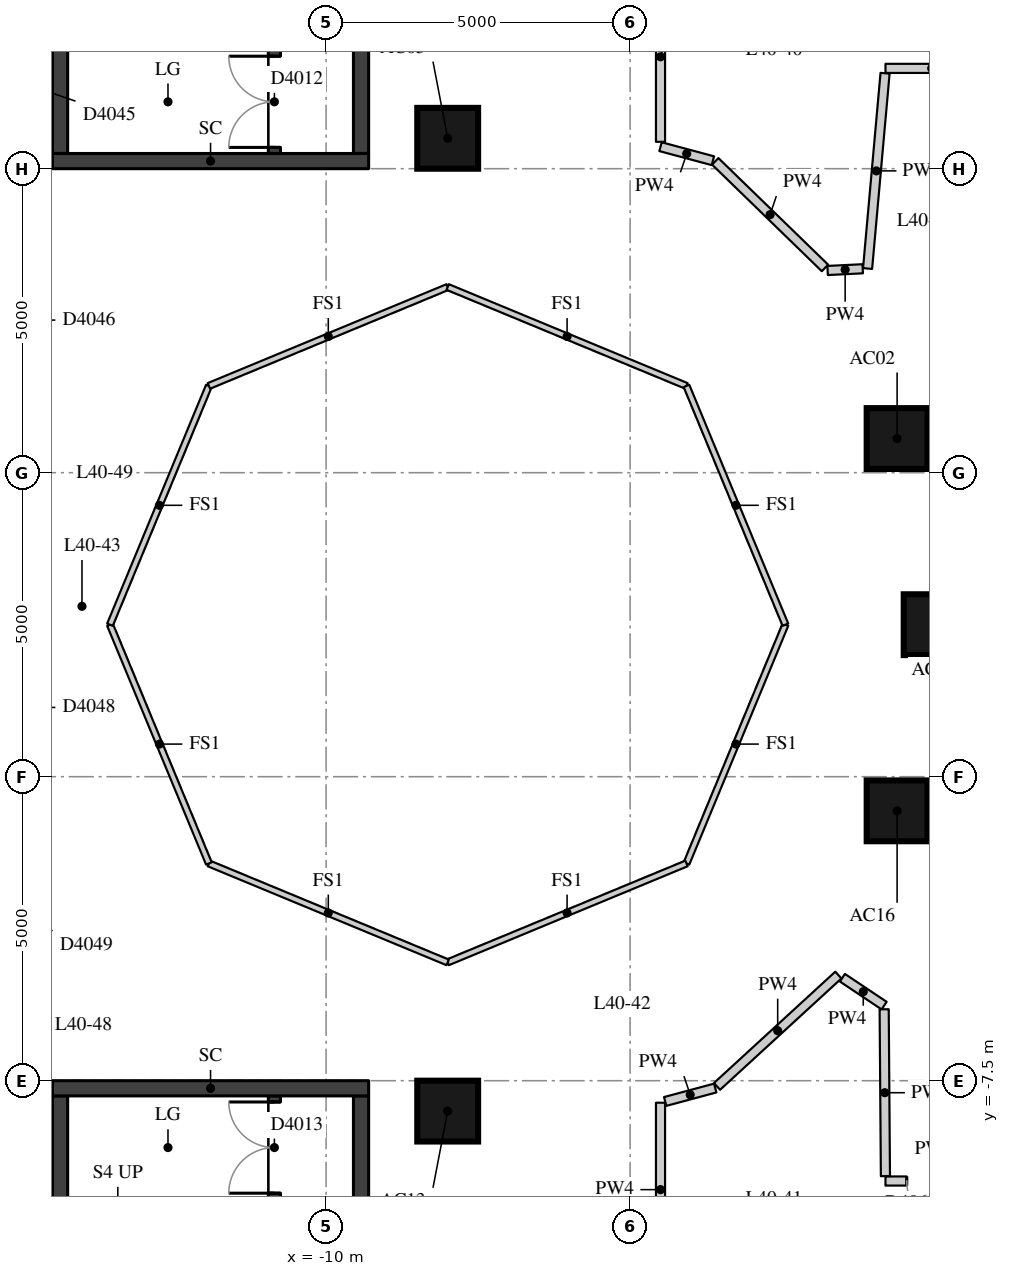
"""IFC4 building model, lengths in metres.
Left out: names, types, materials, properties, quantities, classifications, styles, units other than length and angle.
Written with IfcOpenShell. Run it as: python <this file> out.ifc"""

import sys

from ifc_helpers import new_model, si_unit, direction, frame, frame_2d, origin, origin_2d, place, context, subcontext, project, spatial, rectangle, extrude, element, fill, save


model = new_model("IFC4")
c1 = context("Model", 3, precision=1e-05, world=origin(), true_north=direction((0.0, 1.0)))
c2 = subcontext(c1, "Body", "Model", "MODEL_VIEW")
j1 = project(units=[si_unit("LENGTHUNIT", "METRE"), si_unit("PLANEANGLEUNIT", "RADIAN")], contexts=[c1])
p1 = place(None, origin())
s1 = spatial("IfcSite", under=j1, at=p1, CompositionType="ELEMENT")
p2 = place(p1, origin())
s2 = spatial("IfcBuilding", under=s1, at=p2, CompositionType="ELEMENT")
p3 = place(p2, frame((0.0, 0.0, 145.1)))
s3 = spatial("IfcBuildingStorey", under=s2, at=p3, CompositionType="ELEMENT", Elevation=145.1)
for number, where, z_axis, x_axis in (
    (1, (0.0, 0.0, 0.0), (0.0, 0.0, 1.0), (1.0, 0.0, 0.0)),
    (2, (-0.609, 3.062, 0.0), (0.0, 0.0, 1.0), (1.0, 0.0, 0.0)),
    (3, (-8.0, 8.0, 0.0), (0.0, 0.0, 1.0), (1.0, 0.0, 0.0)),
    (4, (-8.0, -8.0, 0.0), (0.0, 0.0, 1.0), (1.0, 0.0, 0.0)),
    (5, (-0.609, -3.062, 0.0), (0.0, 0.0, 1.0), (1.0, 0.0, 0.0)),
):
    element("IfcColumn", number, at=place(p3, frame(where, z_axis=z_axis, x_axis=x_axis)), inside=s3, PredefinedType="COLUMN", context=c2, shape_type="SweptSolid", body=[
        extrude(rectangle(XDim=1.0, YDim=1.0, at=origin_2d()), origin(), (0.0, 0.0, 1.0), 3.3),
    ])
p4 = place(p3, frame((-10.85, 7.75, 0.0), z_axis=(0.0, 0.0, 1.0), x_axis=(0.0, 1.0, 0.0)))
e6 = element("IfcWall", 6, at=p4, inside=s3, PredefinedType="SHEAR", context=c2, shape_type="SweptSolid", body=[
    extrude(rectangle(XDim=6.0, YDim=0.2, at=frame_2d((3.0, 0.0))), origin(), (0.0, 0.0, 1.0), 3.02),
])
p5 = place(p4, frame((0.1, 0.0, 0.0)))
e7 = element("IfcOpeningElement", 7, at=p5, cuts=e6, PredefinedType="OPENING", context=c2, shape_type="SweptSolid", body=[
    extrude(rectangle(XDim=1.5, YDim=2.1, at=frame_2d((0.75, 1.05))), frame((0.0, 0.11, 0.0), z_axis=(0.0, -1.0, 0.0), x_axis=(1.0, 0.0, 0.0)), (0.0, 0.0, 1.0), 0.22),
])
p6 = place(p3, frame((-10.85, -13.75, 0.0), z_axis=(0.0, 0.0, 1.0), x_axis=(0.0, 1.0, 0.0)))
e8 = element("IfcWall", 8, at=p6, inside=s3, PredefinedType="SHEAR", context=c2, shape_type="SweptSolid", body=[
    extrude(rectangle(XDim=6.0, YDim=0.2, at=frame_2d((3.0, 0.0))), origin(), (0.0, 0.0, 1.0), 3.02),
])
p7 = place(p6, frame((4.4, 0.0, 0.0)))
e9 = element("IfcOpeningElement", 9, at=p7, cuts=e8, PredefinedType="OPENING", context=c2, shape_type="SweptSolid", body=[
    extrude(rectangle(XDim=1.5, YDim=2.1, at=frame_2d((0.75, 1.05))), frame((0.0, 0.11, 0.0), z_axis=(0.0, -1.0, 0.0), x_axis=(1.0, 0.0, 0.0)), (0.0, 0.0, 1.0), 0.22),
])
p8 = place(p3, frame((-14.375, 7.75, -0.28), z_axis=(0.0, 0.0, 1.0), x_axis=(0.0, 1.0, 0.0)))
e10 = element("IfcWall", 10, at=p8, inside=s3, PredefinedType="SHEAR", context=c2, shape_type="SweptSolid", body=[
    extrude(rectangle(XDim=6.0, YDim=0.25, at=frame_2d((3.0, 0.0))), origin(), (0.0, 0.0, 1.0), 3.3),
])
p9 = place(p3, frame((-9.425, 7.75, -0.28), z_axis=(0.0, 0.0, 1.0), x_axis=(0.0, 1.0, 0.0)))
e11 = element("IfcWall", 11, at=p9, inside=s3, PredefinedType="SHEAR", context=c2, shape_type="SweptSolid", body=[
    extrude(rectangle(XDim=6.0, YDim=0.25, at=frame_2d((3.0, 0.0))), origin(), (0.0, 0.0, 1.0), 3.3),
])
p10 = place(p9, frame((2.1, 0.0, 0.28)))
e12 = element("IfcOpeningElement", 12, at=p10, cuts=e11, PredefinedType="OPENING", context=c2, shape_type="SweptSolid", body=[
    extrude(rectangle(XDim=1.5, YDim=2.1, at=frame_2d((0.75, 1.05))), frame((0.0, 0.135, 0.0), z_axis=(0.0, -1.0, 0.0), x_axis=(1.0, 0.0, 0.0)), (0.0, 0.0, 1.0), 0.27),
])
p11 = place(p3, frame((-14.5, 7.625, -0.28), z_axis=(0.0, 0.0, 1.0), x_axis=(1.0, 0.0, 0.0)))
e13 = element("IfcWall", 13, at=p11, inside=s3, PredefinedType="SHEAR", context=c2, shape_type="SweptSolid", body=[
    extrude(rectangle(XDim=5.2, YDim=0.25, at=frame_2d((2.6, 0.0))), origin(), (0.0, 0.0, 1.0), 3.3),
])
p12 = place(p3, frame((-14.375, -13.75, -0.28), z_axis=(0.0, 0.0, 1.0), x_axis=(0.0, 1.0, 0.0)))
e14 = element("IfcWall", 14, at=p12, inside=s3, PredefinedType="SHEAR", context=c2, shape_type="SweptSolid", body=[
    extrude(rectangle(XDim=6.0, YDim=0.25, at=frame_2d((3.0, 0.0))), origin(), (0.0, 0.0, 1.0), 3.3),
])
p13 = place(p3, frame((-9.425, -13.75, -0.28), z_axis=(0.0, 0.0, 1.0), x_axis=(0.0, 1.0, 0.0)))
e15 = element("IfcWall", 15, at=p13, inside=s3, PredefinedType="SHEAR", context=c2, shape_type="SweptSolid", body=[
    extrude(rectangle(XDim=6.0, YDim=0.25, at=frame_2d((3.0, 0.0))), origin(), (0.0, 0.0, 1.0), 3.3),
])
p14 = place(p13, frame((2.4, 0.0, 0.28)))
e16 = element("IfcOpeningElement", 16, at=p14, cuts=e15, PredefinedType="OPENING", context=c2, shape_type="SweptSolid", body=[
    extrude(rectangle(XDim=1.5, YDim=2.1, at=frame_2d((0.75, 1.05))), frame((0.0, 0.135, 0.0), z_axis=(0.0, -1.0, 0.0), x_axis=(1.0, 0.0, 0.0)), (0.0, 0.0, 1.0), 0.27),
])
p15 = place(p3, frame((-14.5, -7.625, -0.28), z_axis=(0.0, 0.0, 1.0), x_axis=(1.0, 0.0, 0.0)))
e17 = element("IfcWall", 17, at=p15, inside=s3, PredefinedType="SHEAR", context=c2, shape_type="SweptSolid", body=[
    extrude(rectangle(XDim=5.2, YDim=0.25, at=frame_2d((2.6, 0.0))), origin(), (0.0, 0.0, 1.0), 3.3),
])
p16 = place(p3, frame((-14.59, -7.807, 0.0), z_axis=(0.0, 0.0, 1.0), x_axis=(-0.280401457903, 0.959882817018, 0.0)))
e18 = element("IfcWall", 18, at=p16, inside=s3, PredefinedType="PARTITIONING", context=c2, shape_type="SweptSolid", body=[
    extrude(rectangle(XDim=2.195, YDim=0.2, at=frame_2d((1.098, 0.0))), origin(), (0.0, 0.0, 1.0), 3.02),
])
p17 = place(p3, frame((-16.228, 7.992, 0.0), z_axis=(0.0, 0.0, 1.0), x_axis=(0.513936465122, 0.857828251935, 0.0)))
e19 = element("IfcWall", 19, at=p17, inside=s3, PredefinedType="PARTITIONING", context=c2, shape_type="SweptSolid", body=[
    extrude(rectangle(XDim=3.21, YDim=0.2, at=frame_2d((1.605, 0.0))), origin(), (0.0, 0.0, 1.0), 3.02),
])
p18 = place(p17, frame((0.848, 0.0, 0.0)))
e20 = element("IfcOpeningElement", 20, at=p18, cuts=e19, PredefinedType="OPENING", context=c2, shape_type="SweptSolid", body=[
    extrude(rectangle(XDim=0.9, YDim=2.1, at=frame_2d((0.45, 1.05))), frame((0.0, 0.11, 0.0), z_axis=(0.0, -1.0, 0.0), x_axis=(1.0, 0.0, 0.0)), (0.0, 0.0, 1.0), 0.22),
])
p19 = place(p3, frame((0.72, 9.15, 0.0), z_axis=(0.0, 0.0, 1.0), x_axis=(-1.0, 0.0, 0.0)))
e21 = element("IfcWall", 21, at=p19, inside=s3, PredefinedType="PARTITIONING", context=c2, shape_type="SweptSolid", body=[
    extrude(rectangle(XDim=1.52, YDim=0.15, at=frame_2d((0.76, 0.0))), origin(), (0.0, 0.0, 1.0), 3.02),
])
p20 = place(p3, frame((-0.807, 9.07, 0.0), z_axis=(0.0, 0.0, 1.0), x_axis=(-0.089184087733, -0.996015159772, 0.0)))
e22 = element("IfcWall", 22, at=p20, inside=s3, PredefinedType="PARTITIONING", context=c2, shape_type="SweptSolid", body=[
    extrude(rectangle(XDim=3.225, YDim=0.15, at=frame_2d((1.612, 0.0))), origin(), (0.0, 0.0, 1.0), 3.02),
])
p21 = place(p3, frame((-1.175, 5.854, 0.0), z_axis=(0.0, 0.0, 1.0), x_axis=(-0.998798267986, -0.049010405705, 0.0)))
e23 = element("IfcWall", 23, at=p21, inside=s3, PredefinedType="PARTITIONING", context=c2, shape_type="SweptSolid", body=[
    extrude(rectangle(XDim=0.578, YDim=0.15, at=frame_2d((0.289, 0.0))), origin(), (0.0, 0.0, 1.0), 3.02),
])
p22 = place(p3, frame((-1.795, 5.867, 0.0), z_axis=(0.0, 0.0, 1.0), x_axis=(-0.717315398231, 0.696748605639, 0.0)))
e24 = element("IfcWall", 24, at=p22, inside=s3, PredefinedType="PARTITIONING", context=c2, shape_type="SweptSolid", body=[
    extrude(rectangle(XDim=2.517, YDim=0.15, at=frame_2d((1.258, 0.0))), origin(), (0.0, 0.0, 1.0), 3.02),
])
p23 = place(p3, frame((-3.639, 7.631, 0.0), z_axis=(0.0, 0.0, 1.0), x_axis=(-0.965879594242, 0.258991523853, 0.0)))
e25 = element("IfcWall", 25, at=p23, inside=s3, PredefinedType="PARTITIONING", context=c2, shape_type="SweptSolid", body=[
    extrude(rectangle(XDim=0.892, YDim=0.15, at=frame_2d((0.446, 0.0))), origin(), (0.0, 0.0, 1.0), 3.02),
])
p24 = place(p3, frame((-4.5, 7.942, 0.0), z_axis=(0.0, 0.0, 1.0), x_axis=(0.0, 1.0, 0.0)))
e26 = element("IfcWall", 26, at=p24, inside=s3, PredefinedType="PARTITIONING", context=c2, shape_type="SweptSolid", body=[
    extrude(rectangle(XDim=2.796, YDim=0.15, at=frame_2d((1.398, 0.0))), origin(), (0.0, 0.0, 1.0), 3.02),
])
p25 = place(p3, frame((-0.8, -9.15, 0.0), z_axis=(0.0, 0.0, 1.0), x_axis=(1.0, 0.0, 0.0)))
e27 = element("IfcWall", 27, at=p25, inside=s3, PredefinedType="PARTITIONING", context=c2, shape_type="SweptSolid", body=[
    extrude(rectangle(XDim=1.6, YDim=0.15, at=frame_2d((0.8, 0.0))), origin(), (0.0, 0.0, 1.0), 3.02),
])
p26 = place(p25, frame((0.35, 0.0, 0.0)))
e28 = element("IfcOpeningElement", 28, at=p26, cuts=e27, PredefinedType="OPENING", context=c2, shape_type="SweptSolid", body=[
    extrude(rectangle(XDim=0.9, YDim=2.1, at=frame_2d((0.45, 1.05))), frame((0.0, 0.085, 0.0), z_axis=(0.0, -1.0, 0.0), x_axis=(1.0, 0.0, 0.0)), (0.0, 0.0, 1.0), 0.17),
])
p27 = place(p3, frame((-4.5, -10.721, 0.0), z_axis=(0.0, 0.0, 1.0), x_axis=(0.0, 1.0, 0.0)))
e29 = element("IfcWall", 29, at=p27, inside=s3, PredefinedType="PARTITIONING", context=c2, shape_type="SweptSolid", body=[
    extrude(rectangle(XDim=2.859, YDim=0.15, at=frame_2d((1.43, 0.0))), origin(), (0.0, 0.0, 1.0), 3.02),
])
p28 = place(p3, frame((-4.423, -7.842, 0.0), z_axis=(0.0, 0.0, 1.0), x_axis=(0.965853333569, 0.259089440221, 0.0)))
e30 = element("IfcWall", 30, at=p28, inside=s3, PredefinedType="PARTITIONING", context=c2, shape_type="SweptSolid", body=[
    extrude(rectangle(XDim=0.852, YDim=0.15, at=frame_2d((0.426, 0.0))), origin(), (0.0, 0.0, 1.0), 3.02),
])
p29 = place(p3, frame((-3.571, -7.594, 0.0), z_axis=(0.0, 0.0, 1.0), x_axis=(0.736783660812, 0.676128565555, 0.0)))
e31 = element("IfcWall", 31, at=p29, inside=s3, PredefinedType="PARTITIONING", context=c2, shape_type="SweptSolid", body=[
    extrude(rectangle(XDim=2.709, YDim=0.15, at=frame_2d((1.354, 0.0))), origin(), (0.0, 0.0, 1.0), 3.02),
])
p30 = place(p3, frame((-1.509, -5.806, 0.0), z_axis=(0.0, 0.0, 1.0), x_axis=(0.831367153095, -0.55572354346, 0.0)))
e32 = element("IfcWall", 32, at=p30, inside=s3, PredefinedType="PARTITIONING", context=c2, shape_type="SweptSolid", body=[
    extrude(rectangle(XDim=0.825, YDim=0.15, at=frame_2d((0.413, 0.0))), origin(), (0.0, 0.0, 1.0), 3.02),
])
p31 = place(p3, frame((-0.822, -6.325, 0.0), z_axis=(0.0, 0.0, 1.0), x_axis=(0.007471771501, -0.999972085926, 0.0)))
e33 = element("IfcWall", 33, at=p31, inside=s3, PredefinedType="PARTITIONING", context=c2, shape_type="SweptSolid", body=[
    extrude(rectangle(XDim=2.745, YDim=0.15, at=frame_2d((1.372, 0.0))), origin(), (0.0, 0.0, 1.0), 3.02),
])
for number, where, z_axis, x_axis in (
    (34, (-2.446, 0.0, 0.0), (0.0, 0.0, 1.0), (-0.383, -0.924, 0.0)),
    (35, (-4.073, -3.927, 0.0), (0.0, 0.0, 1.0), (-0.924, -0.383, 0.0)),
    (36, (-8.0, -5.554, 0.0), (0.0, 0.0, 1.0), (-0.924, 0.383, 0.0)),
    (37, (-11.927, -3.927, 0.0), (0.0, 0.0, 1.0), (-0.383, 0.924, 0.0)),
    (38, (-13.554, 0.0, 0.0), (0.0, 0.0, 1.0), (0.383, 0.924, 0.0)),
    (39, (-11.927, 3.927, 0.0), (0.0, 0.0, 1.0), (0.924, 0.383, 0.0)),
    (40, (-8.0, 5.554, 0.0), (0.0, 0.0, 1.0), (0.924, -0.383, 0.0)),
    (41, (-4.073, 3.927, 0.0), (0.0, 0.0, 1.0), (0.383, -0.924, 0.0)),
):
    element("IfcWall", number, at=place(p3, frame(where, z_axis=z_axis, x_axis=x_axis)), inside=s3, PredefinedType="PARTITIONING", context=c2, shape_type="SweptSolid", body=[
        extrude(rectangle(XDim=4.251, YDim=0.1, at=frame_2d((2.125, 0.0))), origin(), (0.0, 0.0, 1.0), 3.02),
    ])
p32 = place(p5, origin())
e42 = element("IfcDoor", 42, at=p32, inside=s3, OperationType="DOUBLE_DOOR_SINGLE_SWING", PredefinedType="DOOR", context=c2, shape_type="SweptSolid", body=[
    extrude(rectangle(XDim=1.5, YDim=2.1, at=frame_2d((0.75, 1.05))), frame((0.0, 0.025, 0.0), z_axis=(0.0, -1.0, 0.0), x_axis=(1.0, 0.0, 0.0)), (0.0, 0.0, 1.0), 0.05),
])
fill(e7, e42)
p33 = place(p7, origin())
e43 = element("IfcDoor", 43, at=p33, inside=s3, OperationType="DOUBLE_DOOR_SINGLE_SWING", PredefinedType="DOOR", context=c2, shape_type="SweptSolid", body=[
    extrude(rectangle(XDim=1.5, YDim=2.1, at=frame_2d((0.75, 1.05))), frame((0.0, 0.025, 0.0), z_axis=(0.0, -1.0, 0.0), x_axis=(1.0, 0.0, 0.0)), (0.0, 0.0, 1.0), 0.05),
])
fill(e9, e43)
p34 = place(p26, origin())
e44 = element("IfcDoor", 44, at=p34, inside=s3, OperationType="SINGLE_SWING_LEFT", PredefinedType="DOOR", context=c2, shape_type="SweptSolid", body=[
    extrude(rectangle(XDim=0.9, YDim=2.1, at=frame_2d((0.45, 1.05))), frame((0.0, 0.025, 0.0), z_axis=(0.0, -1.0, 0.0), x_axis=(1.0, 0.0, 0.0)), (0.0, 0.0, 1.0), 0.05),
])
fill(e28, e44)
save(model, sys.argv[1])
